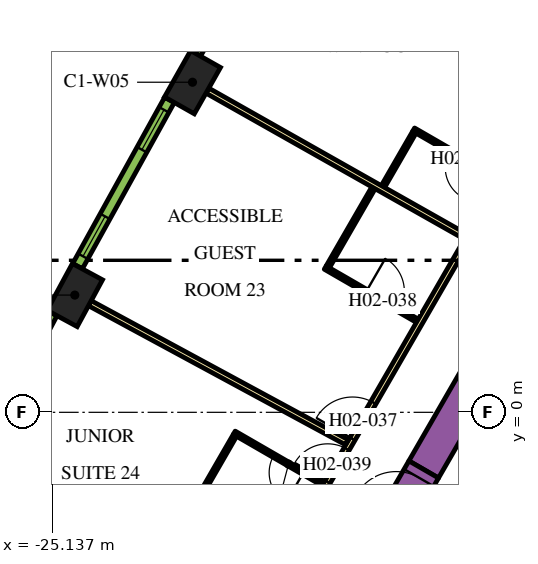
"""IFC4 building model, lengths in metres.
Left out: names, types, materials, properties, quantities, classifications, styles, units other than length and angle.
Written with IfcOpenShell. Run it as: python <this file> out.ifc"""

import sys

from ifc_helpers import new_model, si_unit, direction, frame, frame_2d, origin, origin_2d, place, context, subcontext, project, spatial, rectangle, extrude, element, fill, save


model = new_model("IFC4")
c1 = context("Model", 3, precision=1e-05, world=origin(), true_north=direction((0.0, 1.0)))
c2 = subcontext(c1, "Body", "Model", "MODEL_VIEW")
j1 = project(units=[si_unit("LENGTHUNIT", "METRE"), si_unit("PLANEANGLEUNIT", "RADIAN")], contexts=[c1])
p1 = place(None, origin())
s1 = spatial("IfcSite", under=j1, at=p1, CompositionType="ELEMENT")
p2 = place(p1, origin())
s2 = spatial("IfcBuilding", under=s1, at=p2, CompositionType="ELEMENT")
p3 = place(p2, frame((0.0, 0.0, 39.3)))
s3 = spatial("IfcBuildingStorey", under=s2, at=p3, CompositionType="ELEMENT", Elevation=39.3)
for number, where, z_axis, x_axis in (
    (1, (-21.443, 8.685, 0.0), (0.0, 0.0, 1.0), (-0.492, -0.871, 0.0)),
    (2, (-24.54, 3.085, 0.0), (0.0, 0.0, 1.0), (-0.476, -0.88, 0.0)),
):
    element("IfcColumn", number, at=place(p3, frame(where, z_axis=z_axis, x_axis=x_axis)), inside=s3, PredefinedType="COLUMN", context=c2, shape_type="SweptSolid", body=[
        extrude(rectangle(XDim=1.4, YDim=0.9, at=origin_2d()), origin(), (0.0, 0.0, 1.0), 3.9),
    ])
p4 = place(p3, frame((-15.36, -1.503, 0.0), z_axis=(0.0, 0.0, 1.0), x_axis=(0.50000389221, 0.866023156604, 0.0)))
e3 = element("IfcWall", 3, at=p4, inside=s3, PredefinedType="SOLIDWALL", context=c2, shape_type="SweptSolid", body=[
    extrude(rectangle(XDim=21.0, YDim=0.9, at=frame_2d((10.5, 0.0))), origin(), (0.0, 0.0, 1.0), 3.9),
])
p5 = place(p3, frame((-16.209, -2.976, 0.0), z_axis=(0.0, 0.0, 1.0), x_axis=(0.499954529098, 0.86605165483, 0.0)))
e4 = element("IfcWall", 4, at=p5, inside=s3, PredefinedType="SOLIDWALL", context=c2, shape_type="SweptSolid", body=[
    extrude(rectangle(XDim=1.7, YDim=0.9, at=frame_2d((0.85, 0.0))), origin(), (0.0, 0.0, 1.0), 3.9),
])
p6 = place(p5, frame((0.25, 0.0, 0.0)))
e5 = element("IfcOpeningElement", 5, at=p6, cuts=e4, PredefinedType="OPENING", context=c2, shape_type="SweptSolid", body=[
    extrude(rectangle(XDim=1.2, YDim=2.1, at=frame_2d((0.6, 1.05))), frame((0.0, 0.46, 0.0), z_axis=(0.0, -1.0, 0.0), x_axis=(1.0, 0.0, 0.0)), (0.0, 0.0, 1.0), 0.92),
])
p7 = place(p3, frame((-19.081, -3.9, 0.0), z_axis=(0.0, 0.0, 1.0), x_axis=(0.499998313975, 0.866026377209, 0.0)))
e6 = element("IfcWall", 6, at=p7, inside=s3, PredefinedType="PARTITIONING", context=c2, shape_type="SweptSolid", body=[
    extrude(rectangle(XDim=25.766, YDim=0.15, at=frame_2d((12.883, 0.0))), origin(), (0.0, 0.0, 1.0), 2.75),
])
p8 = place(p7, frame((16.196, 0.0, 0.0)))
e7 = element("IfcOpeningElement", 7, at=p8, cuts=e6, PredefinedType="OPENING", context=c2, shape_type="SweptSolid", body=[
    extrude(rectangle(XDim=1.0, YDim=2.1, at=frame_2d((0.5, 1.05))), frame((0.0, 0.085, 0.0), z_axis=(0.0, -1.0, 0.0), x_axis=(1.0, 0.0, 0.0)), (0.0, 0.0, 1.0), 0.17),
])
p9 = place(p7, frame((14.889, 0.0, 0.0)))
e8 = element("IfcOpeningElement", 8, at=p9, cuts=e6, PredefinedType="OPENING", context=c2, shape_type="SweptSolid", body=[
    extrude(rectangle(XDim=1.0, YDim=2.1, at=frame_2d((0.5, 1.05))), frame((0.0, 0.085, 0.0), z_axis=(0.0, -1.0, 0.0), x_axis=(1.0, 0.0, 0.0)), (0.0, 0.0, 1.0), 0.17),
])
p10 = place(p7, frame((3.698, 0.0, 0.0)))
e9 = element("IfcOpeningElement", 9, at=p10, cuts=e6, PredefinedType="OPENING", context=c2, shape_type="SweptSolid", body=[
    extrude(rectangle(XDim=1.1, YDim=2.1, at=frame_2d((0.55, 1.05))), frame((0.0, 0.085, 0.0), z_axis=(0.0, -1.0, 0.0), x_axis=(1.0, 0.0, 0.0)), (0.0, 0.0, 1.0), 0.17),
])
p11 = place(p7, frame((2.392, 0.0, 0.0)))
e10 = element("IfcOpeningElement", 10, at=p11, cuts=e6, PredefinedType="OPENING", context=c2, shape_type="SweptSolid", body=[
    extrude(rectangle(XDim=1.0, YDim=2.1, at=frame_2d((0.5, 1.05))), frame((0.0, 0.085, 0.0), z_axis=(0.0, -1.0, 0.0), x_axis=(1.0, 0.0, 0.0)), (0.0, 0.0, 1.0), 0.17),
])
p12 = place(p3, frame((-24.145, 2.871, 0.0), z_axis=(0.0, 0.0, 1.0), x_axis=(0.879551725039, -0.475803281809, 0.0)))
e11 = element("IfcWall", 11, at=p12, inside=s3, PredefinedType="PARTITIONING", context=c2, shape_type="SweptSolid", body=[
    extrude(rectangle(XDim=7.688, YDim=0.15, at=frame_2d((3.844, 0.0))), origin(), (0.0, 0.0, 1.0), 2.75),
])
p13 = place(p3, frame((-21.052, 8.464, 0.0), z_axis=(0.0, 0.0, 1.0), x_axis=(0.87059371954, -0.492002617368, 0.0)))
e12 = element("IfcWall", 12, at=p13, inside=s3, PredefinedType="PARTITIONING", context=c2, shape_type="SweptSolid", body=[
    extrude(rectangle(XDim=7.803, YDim=0.15, at=frame_2d((3.902, 0.0))), origin(), (0.0, 0.0, 1.0), 2.75),
])
p14 = place(p3, frame((-13.373, 6.138, 0.0), z_axis=(0.0, 0.0, 1.0), x_axis=(-0.866062058628, 0.499936506574, 0.0)))
e13 = element("IfcWall", 13, at=p14, inside=s3, PredefinedType="PARTITIONING", context=c2, shape_type="SweptSolid", body=[
    extrude(rectangle(XDim=2.6, YDim=0.1, at=frame_2d((1.3, 0.0))), origin(), (0.0, 0.0, 1.0), 2.75),
])
p15 = place(p14, frame((0.6, 0.0, 0.0)))
e14 = element("IfcOpeningElement", 14, at=p15, cuts=e13, PredefinedType="OPENING", context=c2, shape_type="SweptSolid", body=[
    extrude(rectangle(XDim=0.9, YDim=2.1, at=frame_2d((0.45, 1.05))), frame((0.0, 0.06, 0.0), z_axis=(0.0, -1.0, 0.0), x_axis=(1.0, 0.0, 0.0)), (0.0, 0.0, 1.0), 0.12),
])
p16 = place(p3, frame((-15.606, 7.37, 0.0), z_axis=(0.0, 0.0, 1.0), x_axis=(-0.499974350878, -0.866040211805, 0.0)))
e15 = element("IfcWall", 15, at=p16, inside=s3, PredefinedType="PARTITIONING", context=c2, shape_type="SweptSolid", body=[
    extrude(rectangle(XDim=1.65, YDim=0.1, at=frame_2d((0.825, 0.0))), origin(), (0.0, 0.0, 1.0), 2.75),
])
p17 = place(p3, frame((-17.951, 3.808, 0.0), z_axis=(0.0, 0.0, 1.0), x_axis=(0.866034573852, -0.49998411664, 0.0)))
e16 = element("IfcWall", 16, at=p17, inside=s3, PredefinedType="PARTITIONING", context=c2, shape_type="SweptSolid", body=[
    extrude(rectangle(XDim=2.8, YDim=0.1, at=frame_2d((1.4, 0.0))), origin(), (0.0, 0.0, 1.0), 2.75),
])
p18 = place(p17, frame((1.25, 0.0, 0.0)))
e17 = element("IfcOpeningElement", 17, at=p18, cuts=e16, PredefinedType="OPENING", context=c2, shape_type="SweptSolid", body=[
    extrude(rectangle(XDim=1.0, YDim=2.1, at=frame_2d((0.5, 1.05))), frame((0.0, 0.06, 0.0), z_axis=(0.0, -1.0, 0.0), x_axis=(1.0, 0.0, 0.0)), (0.0, 0.0, 1.0), 0.12),
])
p19 = place(p3, frame((-17.878, 3.835, 0.0), z_axis=(0.0, 0.0, 1.0), x_axis=(0.500061428766, 0.865989934965, 0.0)))
e18 = element("IfcWall", 18, at=p19, inside=s3, PredefinedType="PARTITIONING", context=c2, shape_type="SweptSolid", body=[
    extrude(rectangle(XDim=2.39, YDim=0.1, at=frame_2d((1.195, 0.0))), origin(), (0.0, 0.0, 1.0), 2.75),
])
p20 = place(p3, frame((-18.006, -1.888, 0.0), z_axis=(0.0, 0.0, 1.0), x_axis=(-0.866036505625, 0.499980770555, 0.0)))
e19 = element("IfcWall", 19, at=p20, inside=s3, PredefinedType="PARTITIONING", context=c2, shape_type="SweptSolid", body=[
    extrude(rectangle(XDim=2.7, YDim=0.1, at=frame_2d((1.35, 0.0))), origin(), (0.0, 0.0, 1.0), 2.75),
])
p21 = place(p20, frame((0.6, 0.0, 0.0)))
e20 = element("IfcOpeningElement", 20, at=p21, cuts=e19, PredefinedType="OPENING", context=c2, shape_type="SweptSolid", body=[
    extrude(rectangle(XDim=0.9, YDim=2.1, at=frame_2d((0.45, 1.05))), frame((0.0, 0.06, 0.0), z_axis=(0.0, -1.0, 0.0), x_axis=(1.0, 0.0, 0.0)), (0.0, 0.0, 1.0), 0.12),
])
p22 = place(p3, frame((-20.326, -0.606, 0.0), z_axis=(0.0, 0.0, 1.0), x_axis=(-0.499946605688, -0.86605622881, 0.0)))
e21 = element("IfcWall", 21, at=p22, inside=s3, PredefinedType="PARTITIONING", context=c2, shape_type="SweptSolid", body=[
    extrude(rectangle(XDim=2.2, YDim=0.1, at=frame_2d((1.1, 0.0))), origin(), (0.0, 0.0, 1.0), 2.75),
])
p23 = place(p3, frame((-18.858, 13.773, 0.0), z_axis=(0.0, 0.0, 1.0), x_axis=(-0.50002123722, -0.866013142123, 0.0)))
e22 = element("IfcWall", 22, at=p23, inside=s3, PredefinedType="SOLIDWALL", context=c2, shape_type="SweptSolid", body=[
    extrude(rectangle(XDim=4.998, YDim=0.29, at=frame_2d((2.499, 0.0))), origin(), (0.0, 0.0, 1.0), 3.65),
])
p24 = place(p23, frame((0.297, 0.0, 0.9)))
e23 = element("IfcOpeningElement", 23, at=p24, cuts=e22, PredefinedType="OPENING", context=c2, shape_type="SweptSolid", body=[
    extrude(rectangle(XDim=1.2, YDim=2.15, at=frame_2d((0.6, 1.075))), frame((0.0, 0.155, 0.0), z_axis=(0.0, -1.0, 0.0), x_axis=(1.0, 0.0, 0.0)), (0.0, 0.0, 1.0), 0.31),
])
p25 = place(p23, frame((3.501, 0.0, 0.9)))
e24 = element("IfcOpeningElement", 24, at=p25, cuts=e22, PredefinedType="OPENING", context=c2, shape_type="SweptSolid", body=[
    extrude(rectangle(XDim=1.2, YDim=2.15, at=frame_2d((0.6, 1.075))), frame((0.0, 0.155, 0.0), z_axis=(0.0, -1.0, 0.0), x_axis=(1.0, 0.0, 0.0)), (0.0, 0.0, 1.0), 0.31),
])
p26 = place(p3, frame((-22.05, 8.22, 0.0), z_axis=(0.0, 0.0, 1.0), x_axis=(-0.483912572871, -0.875116347589, 0.0)))
e25 = element("IfcWall", 25, at=p26, inside=s3, PredefinedType="SOLIDWALL", context=c2, shape_type="SweptSolid", body=[
    extrude(rectangle(XDim=4.998, YDim=0.29, at=frame_2d((2.499, 0.0))), origin(), (0.0, 0.0, 1.0), 3.65),
])
p27 = place(p26, frame((0.297, 0.0, 0.9)))
e26 = element("IfcOpeningElement", 26, at=p27, cuts=e25, PredefinedType="OPENING", context=c2, shape_type="SweptSolid", body=[
    extrude(rectangle(XDim=1.2, YDim=2.15, at=frame_2d((0.6, 1.075))), frame((0.0, 0.155, 0.0), z_axis=(0.0, -1.0, 0.0), x_axis=(1.0, 0.0, 0.0)), (0.0, 0.0, 1.0), 0.31),
])
p28 = place(p26, frame((3.501, 0.0, 0.9)))
e27 = element("IfcOpeningElement", 27, at=p28, cuts=e25, PredefinedType="OPENING", context=c2, shape_type="SweptSolid", body=[
    extrude(rectangle(XDim=1.2, YDim=2.15, at=frame_2d((0.6, 1.075))), frame((0.0, 0.155, 0.0), z_axis=(0.0, -1.0, 0.0), x_axis=(1.0, 0.0, 0.0)), (0.0, 0.0, 1.0), 0.31),
])
p29 = place(p3, frame((-25.138, 2.608, 0.0), z_axis=(0.0, 0.0, 1.0), x_axis=(-0.467629620899, -0.883924509026, 0.0)))
e28 = element("IfcWall", 28, at=p29, inside=s3, PredefinedType="SOLIDWALL", context=c2, shape_type="SweptSolid", body=[
    extrude(rectangle(XDim=4.998, YDim=0.29, at=frame_2d((2.499, 0.0))), origin(), (0.0, 0.0, 1.0), 3.65),
])
p30 = place(p29, frame((0.297, 0.0, 0.9)))
e29 = element("IfcOpeningElement", 29, at=p30, cuts=e28, PredefinedType="OPENING", context=c2, shape_type="SweptSolid", body=[
    extrude(rectangle(XDim=1.2, YDim=2.15, at=frame_2d((0.6, 1.075))), frame((0.0, 0.155, 0.0), z_axis=(0.0, -1.0, 0.0), x_axis=(1.0, 0.0, 0.0)), (0.0, 0.0, 1.0), 0.31),
])
p31 = place(p29, frame((3.501, 0.0, 0.9)))
e30 = element("IfcOpeningElement", 30, at=p31, cuts=e28, PredefinedType="OPENING", context=c2, shape_type="SweptSolid", body=[
    extrude(rectangle(XDim=1.2, YDim=2.15, at=frame_2d((0.6, 1.075))), frame((0.0, 0.155, 0.0), z_axis=(0.0, -1.0, 0.0), x_axis=(1.0, 0.0, 0.0)), (0.0, 0.0, 1.0), 0.31),
])
p32 = place(p6, origin())
e31 = element("IfcDoor", 31, at=p32, inside=s3, OperationType="SINGLE_SWING_LEFT", PredefinedType="DOOR", context=c2, shape_type="SweptSolid", body=[
    extrude(rectangle(XDim=1.2, YDim=2.1, at=frame_2d((0.6, 1.05))), frame((0.0, 0.025, 0.0), z_axis=(0.0, -1.0, 0.0), x_axis=(1.0, 0.0, 0.0)), (0.0, 0.0, 1.0), 0.05),
])
fill(e5, e31)
p33 = place(p15, origin())
e32 = element("IfcDoor", 32, at=p33, inside=s3, OperationType="SINGLE_SWING_LEFT", PredefinedType="DOOR", context=c2, shape_type="SweptSolid", body=[
    extrude(rectangle(XDim=0.9, YDim=2.1, at=frame_2d((0.45, 1.05))), frame((0.0, 0.025, 0.0), z_axis=(0.0, -1.0, 0.0), x_axis=(1.0, 0.0, 0.0)), (0.0, 0.0, 1.0), 0.05),
])
fill(e14, e32)
p34 = place(p10, origin())
e33 = element("IfcDoor", 33, at=p34, inside=s3, OperationType="SINGLE_SWING_LEFT", PredefinedType="DOOR", context=c2, shape_type="SweptSolid", body=[
    extrude(rectangle(XDim=1.1, YDim=2.1, at=frame_2d((0.55, 1.05))), frame((0.0, 0.025, 0.0), z_axis=(0.0, -1.0, 0.0), x_axis=(1.0, 0.0, 0.0)), (0.0, 0.0, 1.0), 0.05),
])
fill(e9, e33)
p35 = place(p18, origin())
e34 = element("IfcDoor", 34, at=p35, inside=s3, OperationType="SINGLE_SWING_LEFT", PredefinedType="DOOR", context=c2, shape_type="SweptSolid", body=[
    extrude(rectangle(XDim=1.0, YDim=2.1, at=frame_2d((0.5, 1.05))), frame((0.0, 0.025, 0.0), z_axis=(0.0, -1.0, 0.0), x_axis=(1.0, 0.0, 0.0)), (0.0, 0.0, 1.0), 0.05),
])
fill(e17, e34)
p36 = place(p11, origin())
e35 = element("IfcDoor", 35, at=p36, inside=s3, OperationType="SINGLE_SWING_RIGHT", PredefinedType="DOOR", context=c2, shape_type="SweptSolid", body=[
    extrude(rectangle(XDim=1.0, YDim=2.1, at=frame_2d((0.5, 1.05))), frame((0.0, 0.025, 0.0), z_axis=(0.0, -1.0, 0.0), x_axis=(1.0, 0.0, 0.0)), (0.0, 0.0, 1.0), 0.05),
])
fill(e10, e35)
p37 = place(p21, origin())
e36 = element("IfcDoor", 36, at=p37, inside=s3, OperationType="SINGLE_SWING_RIGHT", PredefinedType="DOOR", context=c2, shape_type="SweptSolid", body=[
    extrude(rectangle(XDim=0.9, YDim=2.1, at=frame_2d((0.45, 1.05))), frame((0.0, 0.025, 0.0), z_axis=(0.0, -1.0, 0.0), x_axis=(1.0, 0.0, 0.0)), (0.0, 0.0, 1.0), 0.05),
])
fill(e20, e36)
p38 = place(p27, origin())
e37 = element("IfcWindow", 37, at=p38, inside=s3, PartitioningType="DOUBLE_PANEL_VERTICAL", PredefinedType="WINDOW", context=c2, shape_type="SweptSolid", body=[
    extrude(rectangle(XDim=1.2, YDim=2.15, at=frame_2d((0.6, 1.075))), frame((0.0, 0.015, 0.0), z_axis=(0.0, -1.0, 0.0), x_axis=(1.0, 0.0, 0.0)), (0.0, 0.0, 1.0), 0.06),
])
fill(e26, e37)
p39 = place(p28, origin())
e38 = element("IfcWindow", 38, at=p39, inside=s3, PartitioningType="DOUBLE_PANEL_VERTICAL", PredefinedType="WINDOW", context=c2, shape_type="SweptSolid", body=[
    extrude(rectangle(XDim=1.2, YDim=2.15, at=frame_2d((0.6, 1.075))), frame((0.0, 0.015, 0.0), z_axis=(0.0, -1.0, 0.0), x_axis=(1.0, 0.0, 0.0)), (0.0, 0.0, 1.0), 0.06),
])
fill(e27, e38)
save(model, sys.argv[1])
